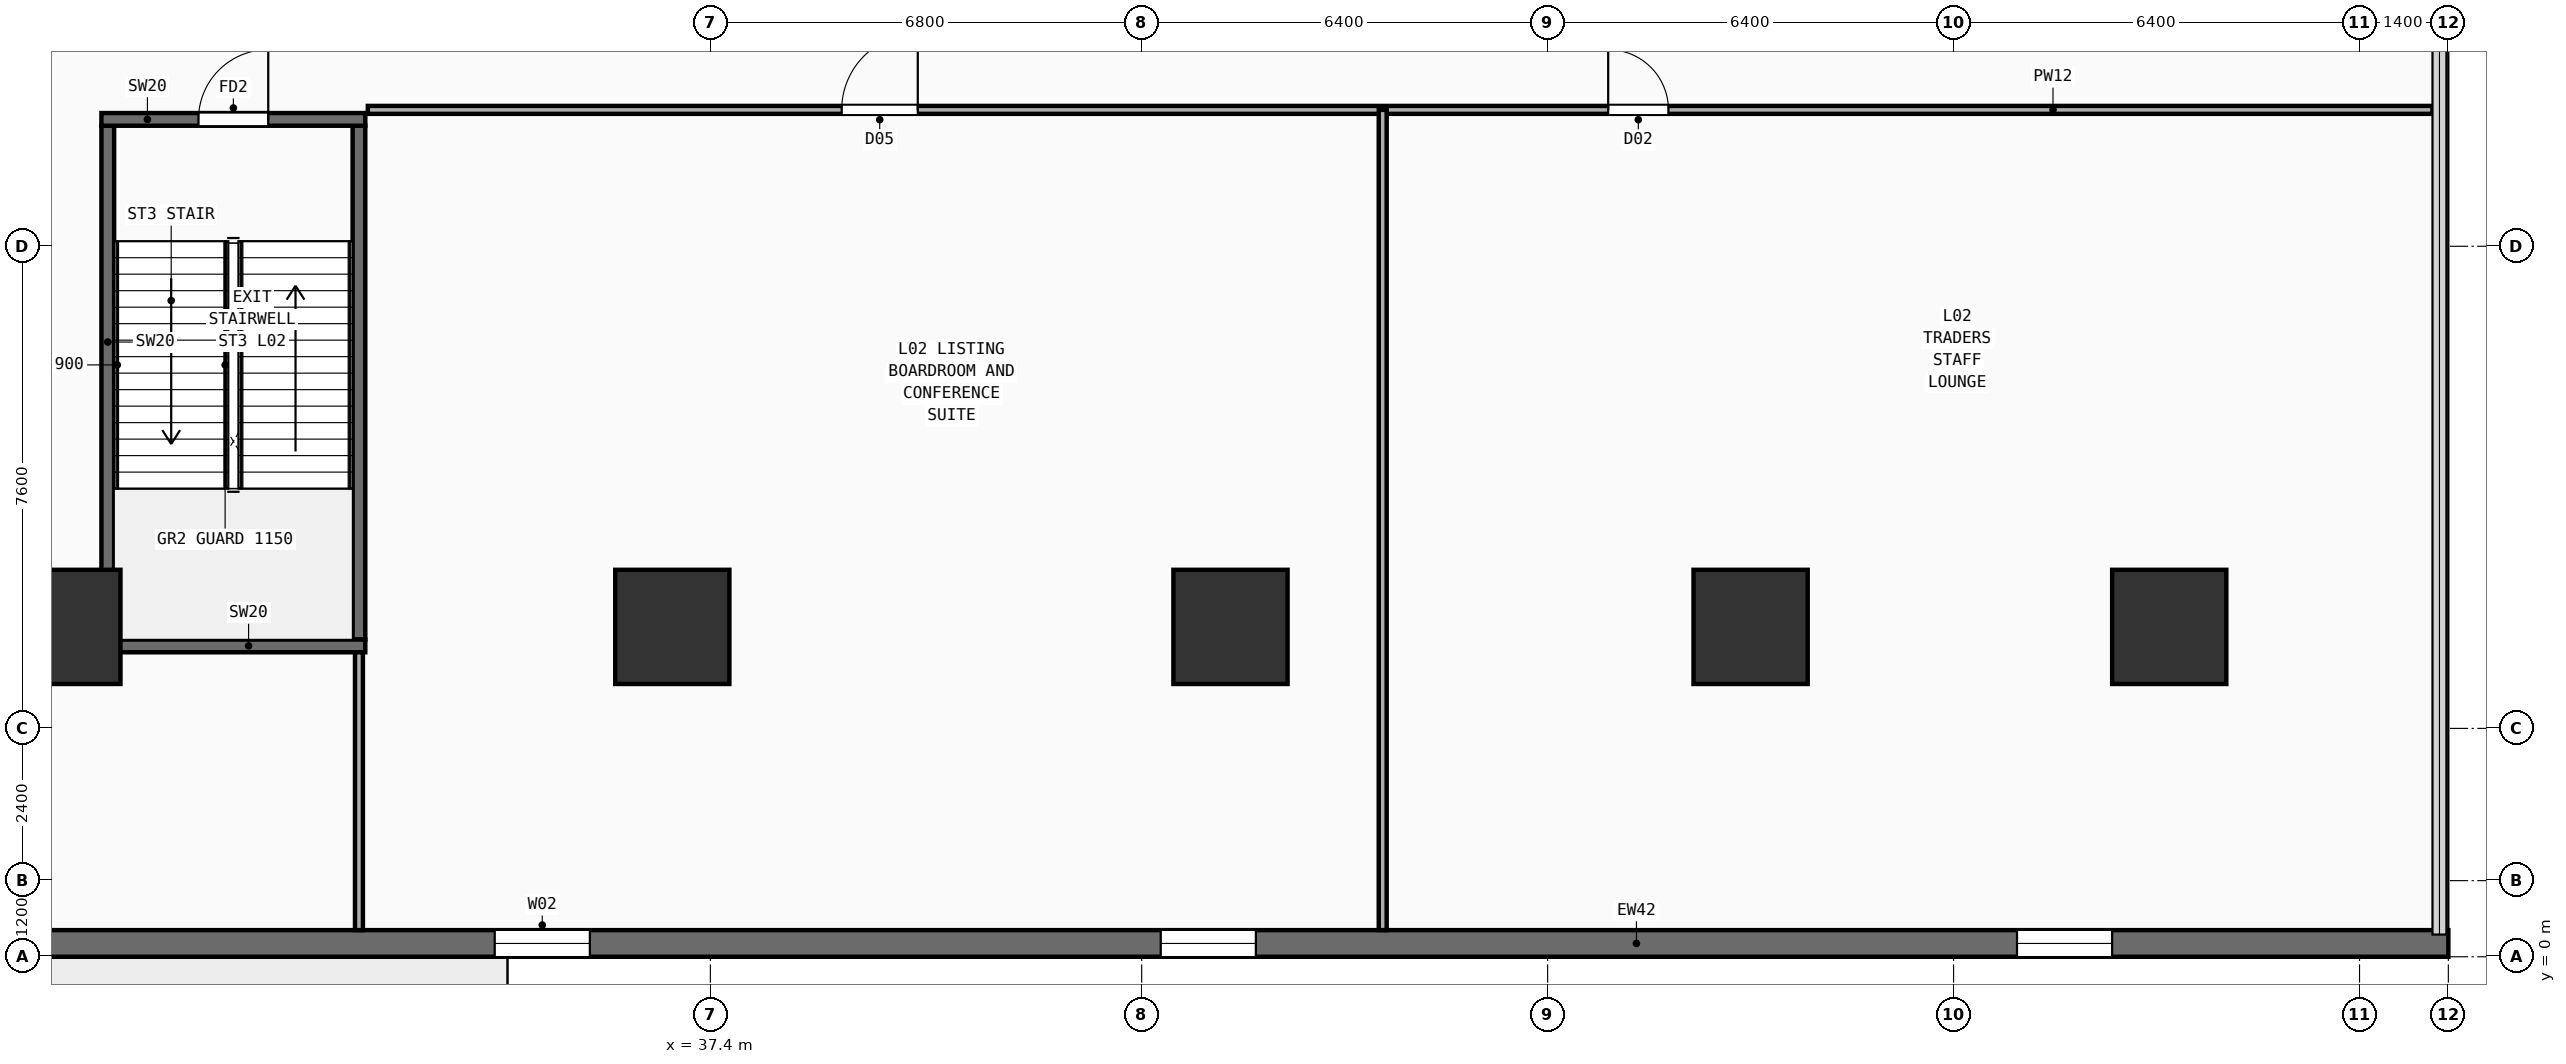
"""IFC4 building model, lengths in metres.
Left out: names, types, materials, properties, quantities, classifications, styles, units other than length and angle.
Written with IfcOpenShell. Run it as: python <this file> out.ifc"""

import sys

from ifc_helpers import new_model, si_unit, direction, frame, frame_2d, origin, origin_2d, place, context, subcontext, project, spatial, rectangle, extrude, element, fill, save


model = new_model("IFC4")
c1 = context("Model", 3, precision=1e-05, world=origin(), true_north=direction((0.0, 1.0)))
c2 = subcontext(c1, "Body", "Model", "MODEL_VIEW")
j1 = project(units=[si_unit("LENGTHUNIT", "METRE"), si_unit("PLANEANGLEUNIT", "RADIAN")], contexts=[c1])
p1 = place(None, origin())
s1 = spatial("IfcSite", under=j1, at=p1, CompositionType="ELEMENT")
p2 = place(p1, origin())
s2 = spatial("IfcBuilding", under=s1, at=p2, CompositionType="ELEMENT")
p3 = place(p2, frame((0.0, 0.0, 5.6)))
s3 = spatial("IfcBuildingStorey", under=s2, at=p3, CompositionType="ELEMENT", Elevation=5.6)
for number, where, z_axis, x_axis in (
    (1, (27.2, 5.2, 0.0), (0.0, 0.0, 1.0), (1.0, 0.0, 0.0)),
    (2, (36.8, 5.2, 0.0), (0.0, 0.0, 1.0), (1.0, 0.0, 0.0)),
    (3, (45.6, 5.2, 0.0), (0.0, 0.0, 1.0), (1.0, 0.0, 0.0)),
    (4, (53.8, 5.2, 0.0), (0.0, 0.0, 1.0), (1.0, 0.0, 0.0)),
    (5, (60.4, 5.2, 0.0), (0.0, 0.0, 1.0), (1.0, 0.0, 0.0)),
):
    element("IfcColumn", number, at=place(p3, frame(where, z_axis=z_axis, x_axis=x_axis)), inside=s3, PredefinedType="COLUMN", context=c2, shape_type="SweptSolid", body=[
        extrude(rectangle(XDim=1.8, YDim=1.8, at=origin_2d()), origin(), (0.0, 0.0, 1.0), 4.46),
    ])
p4 = place(p3, frame((0.0, 0.21, 0.0), z_axis=(0.0, 0.0, 1.0), x_axis=(1.0, 0.0, 0.0)))
e6 = element("IfcWall", 6, at=p4, inside=s3, PredefinedType="SOLIDWALL", context=c2, shape_type="SweptSolid", body=[
    extrude(rectangle(XDim=64.8, YDim=0.42, at=frame_2d((32.4, 0.0))), origin(), (0.0, 0.0, 1.0), 4.46),
])
p5 = place(p4, frame((8.0, 0.0, 0.95)))
e7 = element("IfcOpeningElement", 7, at=p5, cuts=e6, PredefinedType="OPENING", context=c2, shape_type="SweptSolid", body=[
    extrude(rectangle(XDim=1.5, YDim=1.8, at=frame_2d((0.75, 0.9))), frame((0.0, 0.22, 0.0), z_axis=(0.0, -1.0, 0.0), x_axis=(1.0, 0.0, 0.0)), (0.0, 0.0, 1.0), 0.44),
])
p6 = place(p4, frame((16.0, 0.0, 0.95)))
e8 = element("IfcOpeningElement", 8, at=p6, cuts=e6, PredefinedType="OPENING", context=c2, shape_type="SweptSolid", body=[
    extrude(rectangle(XDim=1.5, YDim=1.8, at=frame_2d((0.75, 0.9))), frame((0.0, 0.22, 0.0), z_axis=(0.0, -1.0, 0.0), x_axis=(1.0, 0.0, 0.0)), (0.0, 0.0, 1.0), 0.44),
])
p7 = place(p4, frame((24.0, 0.0, 0.95)))
e9 = element("IfcOpeningElement", 9, at=p7, cuts=e6, PredefinedType="OPENING", context=c2, shape_type="SweptSolid", body=[
    extrude(rectangle(XDim=1.5, YDim=1.8, at=frame_2d((0.75, 0.9))), frame((0.0, 0.22, 0.0), z_axis=(0.0, -1.0, 0.0), x_axis=(1.0, 0.0, 0.0)), (0.0, 0.0, 1.0), 0.44),
])
p8 = place(p4, frame((34.0, 0.0, 0.95)))
e10 = element("IfcOpeningElement", 10, at=p8, cuts=e6, PredefinedType="OPENING", context=c2, shape_type="SweptSolid", body=[
    extrude(rectangle(XDim=1.5, YDim=1.8, at=frame_2d((0.75, 0.9))), frame((0.0, 0.22, 0.0), z_axis=(0.0, -1.0, 0.0), x_axis=(1.0, 0.0, 0.0)), (0.0, 0.0, 1.0), 0.44),
])
p9 = place(p4, frame((44.5, 0.0, 0.95)))
e11 = element("IfcOpeningElement", 11, at=p9, cuts=e6, PredefinedType="OPENING", context=c2, shape_type="SweptSolid", body=[
    extrude(rectangle(XDim=1.5, YDim=1.8, at=frame_2d((0.75, 0.9))), frame((0.0, 0.22, 0.0), z_axis=(0.0, -1.0, 0.0), x_axis=(1.0, 0.0, 0.0)), (0.0, 0.0, 1.0), 0.44),
])
p10 = place(p4, frame((58.0, 0.0, 0.95)))
e12 = element("IfcOpeningElement", 12, at=p10, cuts=e6, PredefinedType="OPENING", context=c2, shape_type="SweptSolid", body=[
    extrude(rectangle(XDim=1.5, YDim=1.8, at=frame_2d((0.75, 0.9))), frame((0.0, 0.22, 0.0), z_axis=(0.0, -1.0, 0.0), x_axis=(1.0, 0.0, 0.0)), (0.0, 0.0, 1.0), 0.44),
])
for number, where, z_axis, x_axis in (
    (13, (27.9, 5.0, 0.0), (0.0, 0.0, 1.0), (0.0, 1.0, 0.0)),
    (14, (31.86, 5.0, 0.0), (0.0, 0.0, 1.0), (0.0, 1.0, 0.0)),
):
    element("IfcWall", number, at=place(p3, frame(where, z_axis=z_axis, x_axis=x_axis)), inside=s3, PredefinedType="SHEAR", context=c2, shape_type="SweptSolid", body=[
        extrude(rectangle(XDim=8.1, YDim=0.2, at=frame_2d((4.05, 0.0))), origin(), (0.0, 0.0, 1.0), 4.46),
    ])
p11 = place(p3, frame((27.8, 4.9, 0.0), z_axis=(0.0, 0.0, 1.0), x_axis=(1.0, 0.0, 0.0)))
e15 = element("IfcWall", 15, at=p11, inside=s3, PredefinedType="SHEAR", context=c2, shape_type="SweptSolid", body=[
    extrude(rectangle(XDim=4.16, YDim=0.2, at=frame_2d((2.08, 0.0))), origin(), (0.0, 0.0, 1.0), 4.46),
])
p12 = place(p3, frame((27.8, 13.2, 0.0), z_axis=(0.0, 0.0, 1.0), x_axis=(1.0, 0.0, 0.0)))
e16 = element("IfcWall", 16, at=p12, inside=s3, PredefinedType="SHEAR", context=c2, shape_type="SweptSolid", body=[
    extrude(rectangle(XDim=4.16, YDim=0.2, at=frame_2d((2.08, 0.0))), origin(), (0.0, 0.0, 1.0), 4.46),
])
p13 = place(p12, frame((1.53, 0.0, 0.0)))
e17 = element("IfcOpeningElement", 17, at=p13, cuts=e16, PredefinedType="OPENING", context=c2, shape_type="SweptSolid", body=[
    extrude(rectangle(XDim=1.1, YDim=2.2, at=frame_2d((0.55, 1.1))), frame((0.0, 0.11, 0.0), z_axis=(0.0, -1.0, 0.0), x_axis=(1.0, 0.0, 0.0)), (0.0, 0.0, 1.0), 0.22),
])
p14 = place(p3, frame((32.0, 13.35, 0.0), z_axis=(0.0, 0.0, 1.0), x_axis=(1.0, 0.0, 0.0)))
e18 = element("IfcWall", 18, at=p14, inside=s3, PredefinedType="PARTITIONING", context=c2, shape_type="SweptSolid", body=[
    extrude(rectangle(XDim=32.55, YDim=0.125, at=frame_2d((16.275, 0.0))), origin(), (0.0, 0.0, 1.0), 3.96),
])
p15 = place(p14, frame((7.47, 0.0, 0.0)))
e19 = element("IfcOpeningElement", 19, at=p15, cuts=e18, PredefinedType="OPENING", context=c2, shape_type="SweptSolid", body=[
    extrude(rectangle(XDim=1.2, YDim=2.25, at=frame_2d((0.6, 1.125))), frame((0.0, 0.073, 0.0), z_axis=(0.0, -1.0, 0.0), x_axis=(1.0, 0.0, 0.0)), (0.0, 0.0, 1.0), 0.145),
])
p16 = place(p14, frame((19.555, 0.0, 0.0)))
e20 = element("IfcOpeningElement", 20, at=p16, cuts=e18, PredefinedType="OPENING", context=c2, shape_type="SweptSolid", body=[
    extrude(rectangle(XDim=0.95, YDim=2.15, at=frame_2d((0.475, 1.075))), frame((0.0, 0.073, 0.0), z_axis=(0.0, -1.0, 0.0), x_axis=(1.0, 0.0, 0.0)), (0.0, 0.0, 1.0), 0.145),
])
p17 = place(p3, frame((31.86, 0.42, 0.0), z_axis=(0.0, 0.0, 1.0), x_axis=(0.0, 1.0, 0.0)))
e21 = element("IfcWall", 21, at=p17, inside=s3, PredefinedType="PARTITIONING", context=c2, shape_type="SweptSolid", body=[
    extrude(rectangle(XDim=4.38, YDim=0.125, at=frame_2d((2.19, 0.0))), origin(), (0.0, 0.0, 1.0), 4.46),
])
p18 = place(p3, frame((48.0, 0.42, 0.0), z_axis=(0.0, 0.0, 1.0), x_axis=(0.0, 1.0, 0.0)))
e22 = element("IfcWall", 22, at=p18, inside=s3, PredefinedType="PARTITIONING", context=c2, shape_type="SweptSolid", body=[
    extrude(rectangle(XDim=12.93, YDim=0.125, at=frame_2d((6.465, 0.0))), origin(), (0.0, 0.0, 1.0), 4.46),
])
p19 = place(p8, origin())
e23 = element("IfcWindow", 23, at=p19, inside=s3, PartitioningType="SINGLE_PANEL", PredefinedType="WINDOW", context=c2, shape_type="SweptSolid", body=[
    extrude(rectangle(XDim=1.5, YDim=1.8, at=frame_2d((0.75, 0.9))), frame((0.0, 0.03, 0.0), z_axis=(0.0, -1.0, 0.0), x_axis=(1.0, 0.0, 0.0)), (0.0, 0.0, 1.0), 0.06),
])
fill(e10, e23)
p20 = place(p9, origin())
e24 = element("IfcWindow", 24, at=p20, inside=s3, PartitioningType="SINGLE_PANEL", PredefinedType="WINDOW", context=c2, shape_type="SweptSolid", body=[
    extrude(rectangle(XDim=1.5, YDim=1.8, at=frame_2d((0.75, 0.9))), frame((0.0, 0.03, 0.0), z_axis=(0.0, -1.0, 0.0), x_axis=(1.0, 0.0, 0.0)), (0.0, 0.0, 1.0), 0.06),
])
fill(e11, e24)
p21 = place(p10, origin())
e25 = element("IfcWindow", 25, at=p21, inside=s3, PartitioningType="SINGLE_PANEL", PredefinedType="WINDOW", context=c2, shape_type="SweptSolid", body=[
    extrude(rectangle(XDim=1.5, YDim=1.8, at=frame_2d((0.75, 0.9))), frame((0.0, 0.03, 0.0), z_axis=(0.0, -1.0, 0.0), x_axis=(1.0, 0.0, 0.0)), (0.0, 0.0, 1.0), 0.06),
])
fill(e12, e25)
p22 = place(p13, frame((1.1, 0.0, 0.0), z_axis=(0.0, 0.0, 1.0), x_axis=(-1.0, 0.0, 0.0)))
e26 = element("IfcDoor", 26, at=p22, inside=s3, OperationType="SINGLE_SWING_LEFT", PredefinedType="DOOR", context=c2, shape_type="SweptSolid", body=[
    extrude(rectangle(XDim=1.1, YDim=2.2, at=frame_2d((0.55, 1.1))), frame((0.0, 0.025, 0.0), z_axis=(0.0, -1.0, 0.0), x_axis=(1.0, 0.0, 0.0)), (0.0, 0.0, 1.0), 0.05),
])
fill(e17, e26)
p23 = place(p15, origin())
e27 = element("IfcDoor", 27, at=p23, inside=s3, OperationType="SINGLE_SWING_RIGHT", PredefinedType="DOOR", context=c2, shape_type="SweptSolid", body=[
    extrude(rectangle(XDim=1.2, YDim=2.25, at=frame_2d((0.6, 1.125))), frame((0.0, 0.025, 0.0), z_axis=(0.0, -1.0, 0.0), x_axis=(1.0, 0.0, 0.0)), (0.0, 0.0, 1.0), 0.05),
])
fill(e19, e27)
p24 = place(p16, origin())
e28 = element("IfcDoor", 28, at=p24, inside=s3, OperationType="SINGLE_SWING_LEFT", PredefinedType="DOOR", context=c2, shape_type="SweptSolid", body=[
    extrude(rectangle(XDim=0.95, YDim=2.15, at=frame_2d((0.475, 1.075))), frame((0.0, 0.025, 0.0), z_axis=(0.0, -1.0, 0.0), x_axis=(1.0, 0.0, 0.0)), (0.0, 0.0, 1.0), 0.05),
])
fill(e20, e28)
save(model, sys.argv[1])
